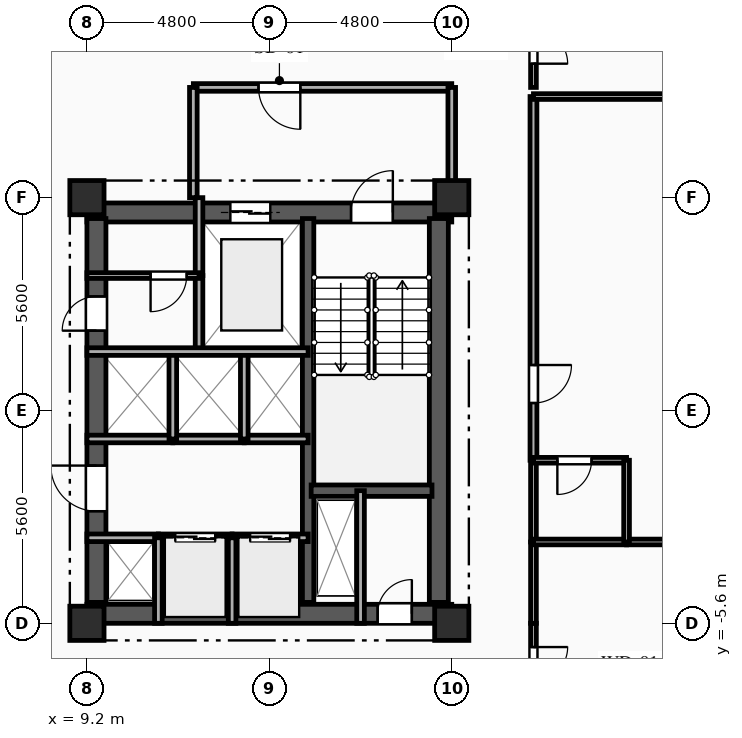
"""IFC4 building model, lengths in metres.
Left out: names, types, materials, properties, quantities, classifications, styles, units other than length and angle.
Written with IfcOpenShell. Run it as: python <this file> out.ifc"""

import sys

from ifc_helpers import new_model, si_unit, direction, frame, frame_2d, origin, origin_2d, place, context, subcontext, project, spatial, rectangle, extrude, element, fill, save


model = new_model("IFC4")
c1 = context("Model", 3, precision=1e-05, world=origin(), true_north=direction((0.0, 1.0)))
c2 = subcontext(c1, "Body", "Model", "MODEL_VIEW")
j1 = project(units=[si_unit("LENGTHUNIT", "METRE"), si_unit("PLANEANGLEUNIT", "RADIAN")], contexts=[c1])
p1 = place(None, origin())
s1 = spatial("IfcSite", under=j1, at=p1, CompositionType="ELEMENT")
p2 = place(p1, origin())
s2 = spatial("IfcBuilding", under=s1, at=p2, CompositionType="ELEMENT")
p3 = place(p2, frame((0.0, 0.0, 151.1)))
s3 = spatial("IfcBuildingStorey", under=s2, at=p3, CompositionType="ELEMENT", Elevation=151.1)
for number, where, z_axis, x_axis in (
    (1, (9.2, -5.6, 0.0), (0.0, 0.0, 1.0), (1.0, 0.0, 0.0)),
    (2, (9.2, 5.6, 0.0), (0.0, 0.0, 1.0), (1.0, 0.0, 0.0)),
    (3, (18.8, -5.6, 0.0), (0.0, 0.0, 1.0), (1.0, 0.0, 0.0)),
    (4, (18.8, 5.6, 0.0), (0.0, 0.0, 1.0), (1.0, 0.0, 0.0)),
):
    element("IfcColumn", number, at=place(p3, frame(where, z_axis=z_axis, x_axis=x_axis)), inside=s3, PredefinedType="COLUMN", context=c2, shape_type="SweptSolid", body=[
        extrude(rectangle(XDim=0.9, YDim=0.9, at=origin_2d()), origin(), (0.0, 0.0, 1.0), 3.35),
    ])
p4 = place(p3, frame((9.2, 5.21, 0.0), z_axis=(0.0, 0.0, 1.0), x_axis=(1.0, 0.0, 0.0)))
e5 = element("IfcWall", 5, at=p4, inside=s3, PredefinedType="SHEAR", context=c2, shape_type="SweptSolid", body=[
    extrude(rectangle(XDim=9.6, YDim=0.5, at=frame_2d((4.8, 0.0))), origin(), (0.0, 0.0, 1.0), 3.04),
])
p5 = place(p4, frame((6.95, 0.0, 0.0)))
e6 = element("IfcOpeningElement", 6, at=p5, cuts=e5, PredefinedType="OPENING", context=c2, shape_type="SweptSolid", body=[
    extrude(rectangle(XDim=1.1, YDim=2.15, at=frame_2d((0.55, 1.075))), frame((0.0, 0.26, 0.0), z_axis=(0.0, -1.0, 0.0), x_axis=(1.0, 0.0, 0.0)), (0.0, 0.0, 1.0), 0.52),
])
p6 = place(p4, frame((3.775, 0.0, 0.0)))
e7 = element("IfcOpeningElement", 7, at=p6, cuts=e5, PredefinedType="OPENING", context=c2, shape_type="SweptSolid", body=[
    extrude(rectangle(XDim=1.05, YDim=2.1, at=frame_2d((0.525, 1.05))), frame((0.0, 0.26, 0.0), z_axis=(0.0, -1.0, 0.0), x_axis=(1.0, 0.0, 0.0)), (0.0, 0.0, 1.0), 0.52),
])
p7 = place(p3, frame((9.2, -5.35, 0.0), z_axis=(0.0, 0.0, 1.0), x_axis=(1.0, 0.0, 0.0)))
e8 = element("IfcWall", 8, at=p7, inside=s3, PredefinedType="SHEAR", context=c2, shape_type="SweptSolid", body=[
    extrude(rectangle(XDim=9.6, YDim=0.5, at=frame_2d((4.8, 0.0))), origin(), (0.0, 0.0, 1.0), 3.04),
])
p8 = place(p7, frame((7.65, 0.0, 0.0)))
e9 = element("IfcOpeningElement", 9, at=p8, cuts=e8, PredefinedType="OPENING", context=c2, shape_type="SweptSolid", body=[
    extrude(rectangle(XDim=0.9, YDim=2.1, at=frame_2d((0.45, 1.05))), frame((0.0, 0.26, 0.0), z_axis=(0.0, -1.0, 0.0), x_axis=(1.0, 0.0, 0.0)), (0.0, 0.0, 1.0), 0.52),
])
p9 = place(p3, frame((9.45, -5.05, 0.0), z_axis=(0.0, 0.0, 1.0), x_axis=(0.0, 1.0, 0.0)))
e10 = element("IfcWall", 10, at=p9, inside=s3, PredefinedType="SHEAR", context=c2, shape_type="SweptSolid", body=[
    extrude(rectangle(XDim=10.1, YDim=0.5, at=frame_2d((5.05, 0.0))), origin(), (0.0, 0.0, 1.0), 3.04),
])
p10 = place(p9, frame((7.15, 0.0, 0.0)))
e11 = element("IfcOpeningElement", 11, at=p10, cuts=e10, PredefinedType="OPENING", context=c2, shape_type="SweptSolid", body=[
    extrude(rectangle(XDim=0.9, YDim=2.1, at=frame_2d((0.45, 1.05))), frame((0.0, 0.26, 0.0), z_axis=(0.0, -1.0, 0.0), x_axis=(1.0, 0.0, 0.0)), (0.0, 0.0, 1.0), 0.52),
])
p11 = place(p9, frame((2.4, 0.0, 0.0)))
e12 = element("IfcOpeningElement", 12, at=p11, cuts=e10, PredefinedType="OPENING", context=c2, shape_type="SweptSolid", body=[
    extrude(rectangle(XDim=1.2, YDim=2.15, at=frame_2d((0.6, 1.075))), frame((0.0, 0.26, 0.0), z_axis=(0.0, -1.0, 0.0), x_axis=(1.0, 0.0, 0.0)), (0.0, 0.0, 1.0), 0.52),
])
p12 = place(p3, frame((18.46, -5.05, 0.0), z_axis=(0.0, 0.0, 1.0), x_axis=(0.0, 1.0, 0.0)))
e13 = element("IfcWall", 13, at=p12, inside=s3, PredefinedType="SHEAR", context=c2, shape_type="SweptSolid", body=[
    extrude(rectangle(XDim=10.1, YDim=0.5, at=frame_2d((5.05, 0.0))), origin(), (0.0, 0.0, 1.0), 3.04),
])
p13 = place(p3, frame((15.02, -5.05, 0.0), z_axis=(0.0, 0.0, 1.0), x_axis=(0.0, 1.0, 0.0)))
e14 = element("IfcWall", 14, at=p13, inside=s3, PredefinedType="SHEAR", context=c2, shape_type="SweptSolid", body=[
    extrude(rectangle(XDim=10.1, YDim=0.3, at=frame_2d((5.05, 0.0))), origin(), (0.0, 0.0, 1.0), 3.04),
])
p14 = place(p3, frame((15.1, -2.11, 0.0), z_axis=(0.0, 0.0, 1.0), x_axis=(1.0, 0.0, 0.0)))
e15 = element("IfcWall", 15, at=p14, inside=s3, PredefinedType="SHEAR", context=c2, shape_type="SweptSolid", body=[
    extrude(rectangle(XDim=3.18, YDim=0.3, at=frame_2d((1.59, 0.0))), origin(), (0.0, 0.0, 1.0), 3.04),
])
p15 = place(p3, frame((16.4, -2.11, 0.0), z_axis=(0.0, 0.0, 1.0), x_axis=(0.0, -1.0, 0.0)))
e16 = element("IfcWall", 16, at=p15, inside=s3, PredefinedType="PARTITIONING", context=c2, shape_type="SweptSolid", body=[
    extrude(rectangle(XDim=3.49, YDim=0.2, at=frame_2d((1.745, 0.0))), origin(), (0.0, 0.0, 1.0), 3.04),
])
p16 = place(p3, frame((12.15, 3.55, 0.0), z_axis=(0.0, 0.0, 1.0), x_axis=(0.0, -1.0, 0.0)))
e17 = element("IfcWall", 17, at=p16, inside=s3, PredefinedType="PARTITIONING", context=c2, shape_type="SweptSolid", body=[
    extrude(rectangle(XDim=2.0, YDim=0.2, at=frame_2d((1.0, 0.0))), origin(), (0.0, 0.0, 1.0), 3.04),
])
p17 = place(p3, frame((12.15, 5.6, 0.0), z_axis=(0.0, 0.0, 1.0), x_axis=(0.0, -1.0, 0.0)))
e18 = element("IfcWall", 18, at=p17, inside=s3, PredefinedType="PARTITIONING", context=c2, shape_type="SweptSolid", body=[
    extrude(rectangle(XDim=2.05, YDim=0.2, at=frame_2d((1.025, 0.0))), origin(), (0.0, 0.0, 1.0), 3.04),
])
p18 = place(p3, frame((18.8, 8.5, 0.0), z_axis=(0.0, 0.0, 1.0), x_axis=(-1.0, 0.0, 0.0)))
e19 = element("IfcWall", 19, at=p18, inside=s3, PredefinedType="PARTITIONING", context=c2, shape_type="SweptSolid", body=[
    extrude(rectangle(XDim=6.8, YDim=0.2, at=frame_2d((3.4, 0.0))), origin(), (0.0, 0.0, 1.0), 3.04),
])
p19 = place(p18, frame((3.985, 0.0, 0.0)))
e20 = element("IfcOpeningElement", 20, at=p19, cuts=e19, PredefinedType="OPENING", context=c2, shape_type="SweptSolid", body=[
    extrude(rectangle(XDim=1.1, YDim=2.15, at=frame_2d((0.55, 1.075))), frame((0.0, 0.11, 0.0), z_axis=(0.0, -1.0, 0.0), x_axis=(1.0, 0.0, 0.0)), (0.0, 0.0, 1.0), 0.22),
])
p20 = place(p3, frame((18.8, 5.6, 0.0), z_axis=(0.0, 0.0, 1.0), x_axis=(0.0, 1.0, 0.0)))
e21 = element("IfcWall", 21, at=p20, inside=s3, PredefinedType="PARTITIONING", context=c2, shape_type="SweptSolid", body=[
    extrude(rectangle(XDim=2.9, YDim=0.2, at=frame_2d((1.45, 0.0))), origin(), (0.0, 0.0, 1.0), 2.525),
])
p21 = place(p3, frame((12.0, 8.5, 0.0), z_axis=(0.0, 0.0, 1.0), x_axis=(0.0, -1.0, 0.0)))
e22 = element("IfcWall", 22, at=p21, inside=s3, PredefinedType="PARTITIONING", context=c2, shape_type="SweptSolid", body=[
    extrude(rectangle(XDim=2.9, YDim=0.2, at=frame_2d((1.45, 0.0))), origin(), (0.0, 0.0, 1.0), 3.04),
])
p22 = place(p3, frame((12.15, 3.55, 0.0), z_axis=(0.0, 0.0, 1.0), x_axis=(-1.0, 0.0, 0.0)))
e23 = element("IfcWall", 23, at=p22, inside=s3, PredefinedType="PARTITIONING", context=c2, shape_type="SweptSolid", body=[
    extrude(rectangle(XDim=2.95, YDim=0.15, at=frame_2d((1.475, 0.0))), origin(), (0.0, 0.0, 1.0), 3.04),
])
p23 = place(p22, frame((0.325, 0.0, 0.0)))
e24 = element("IfcOpeningElement", 24, at=p23, cuts=e23, PredefinedType="OPENING", context=c2, shape_type="SweptSolid", body=[
    extrude(rectangle(XDim=0.95, YDim=2.1, at=frame_2d((0.475, 1.05))), frame((0.0, 0.085, 0.0), z_axis=(0.0, -1.0, 0.0), x_axis=(1.0, 0.0, 0.0)), (0.0, 0.0, 1.0), 0.17),
])
p24 = place(p3, frame((9.2, -3.35, 0.0), z_axis=(0.0, 0.0, 1.0), x_axis=(1.0, 0.0, 0.0)))
e25 = element("IfcWall", 25, at=p24, inside=s3, PredefinedType="PARTITIONING", context=c2, shape_type="SweptSolid", body=[
    extrude(rectangle(XDim=1.88, YDim=0.2, at=frame_2d((0.94, 0.0))), origin(), (0.0, 0.0, 1.0), 2.755),
])
p25 = place(p3, frame((11.08, -3.35, 0.0), z_axis=(0.0, 0.0, 1.0), x_axis=(1.0, 0.0, 0.0)))
e26 = element("IfcWall", 26, at=p25, inside=s3, PredefinedType="PARTITIONING", context=c2, shape_type="SweptSolid", body=[
    extrude(rectangle(XDim=1.94, YDim=0.2, at=frame_2d((0.97, 0.0))), origin(), (0.0, 0.0, 1.0), 3.04),
])
p26 = place(p25, frame((0.445, 0.0, 0.0)))
e27 = element("IfcOpeningElement", 27, at=p26, cuts=e26, PredefinedType="OPENING", context=c2, shape_type="SweptSolid", body=[
    extrude(rectangle(XDim=1.05, YDim=2.1, at=frame_2d((0.525, 1.05))), frame((0.0, 0.11, 0.0), z_axis=(0.0, -1.0, 0.0), x_axis=(1.0, 0.0, 0.0)), (0.0, 0.0, 1.0), 0.22),
])
p27 = place(p3, frame((13.02, -3.35, 0.0), z_axis=(0.0, 0.0, 1.0), x_axis=(1.0, 0.0, 0.0)))
e28 = element("IfcWall", 28, at=p27, inside=s3, PredefinedType="PARTITIONING", context=c2, shape_type="SweptSolid", body=[
    extrude(rectangle(XDim=2.0, YDim=0.2, at=frame_2d((1.0, 0.0))), origin(), (0.0, 0.0, 1.0), 3.04),
])
p28 = place(p27, frame((0.475, 0.0, 0.0)))
e29 = element("IfcOpeningElement", 29, at=p28, cuts=e28, PredefinedType="OPENING", context=c2, shape_type="SweptSolid", body=[
    extrude(rectangle(XDim=1.05, YDim=2.1, at=frame_2d((0.525, 1.05))), frame((0.0, 0.11, 0.0), z_axis=(0.0, -1.0, 0.0), x_axis=(1.0, 0.0, 0.0)), (0.0, 0.0, 1.0), 0.22),
])
p29 = place(p3, frame((11.46, -0.75, 0.0), z_axis=(0.0, 0.0, 1.0), x_axis=(-1.0, 0.0, 0.0)))
e30 = element("IfcWall", 30, at=p29, inside=s3, PredefinedType="PARTITIONING", context=c2, shape_type="SweptSolid", body=[
    extrude(rectangle(XDim=2.26, YDim=0.2, at=frame_2d((1.13, 0.0))), origin(), (0.0, 0.0, 1.0), 3.04),
])
p30 = place(p3, frame((13.34, -0.75, 0.0), z_axis=(0.0, 0.0, 1.0), x_axis=(-1.0, 0.0, 0.0)))
e31 = element("IfcWall", 31, at=p30, inside=s3, PredefinedType="PARTITIONING", context=c2, shape_type="SweptSolid", body=[
    extrude(rectangle(XDim=1.88, YDim=0.2, at=frame_2d((0.94, 0.0))), origin(), (0.0, 0.0, 1.0), 3.04),
])
p31 = place(p3, frame((15.02, -0.75, 0.0), z_axis=(0.0, 0.0, 1.0), x_axis=(-1.0, 0.0, 0.0)))
e32 = element("IfcWall", 32, at=p31, inside=s3, PredefinedType="PARTITIONING", context=c2, shape_type="SweptSolid", body=[
    extrude(rectangle(XDim=1.68, YDim=0.2, at=frame_2d((0.84, 0.0))), origin(), (0.0, 0.0, 1.0), 3.04),
])
for number, where, z_axis, x_axis in (
    (33, (11.08, -5.6, 0.0), (0.0, 0.0, 1.0), (0.0, 1.0, 0.0)),
    (34, (13.02, -5.6, 0.0), (0.0, 0.0, 1.0), (0.0, 1.0, 0.0)),
):
    element("IfcWall", number, at=place(p3, frame(where, z_axis=z_axis, x_axis=x_axis)), inside=s3, PredefinedType="PARTITIONING", context=c2, shape_type="SweptSolid", body=[
        extrude(rectangle(XDim=2.25, YDim=0.2, at=frame_2d((1.125, 0.0))), origin(), (0.0, 0.0, 1.0), 3.04),
    ])
for number, where, z_axis, x_axis in (
    (35, (11.46, -0.75, 0.0), (0.0, 0.0, 1.0), (0.0, 1.0, 0.0)),
    (36, (13.34, -0.75, 0.0), (0.0, 0.0, 1.0), (0.0, 1.0, 0.0)),
):
    element("IfcWall", number, at=place(p3, frame(where, z_axis=z_axis, x_axis=x_axis)), inside=s3, PredefinedType="PARTITIONING", context=c2, shape_type="SweptSolid", body=[
        extrude(rectangle(XDim=2.3, YDim=0.2, at=frame_2d((1.15, 0.0))), origin(), (0.0, 0.0, 1.0), 3.04),
    ])
p32 = place(p3, frame((20.95, 10.65, 0.0), z_axis=(0.0, 0.0, 1.0), x_axis=(0.0, -1.0, 0.0)))
e37 = element("IfcWall", 37, at=p32, inside=s3, PredefinedType="PARTITIONING", context=c2, shape_type="SweptSolid", body=[
    extrude(rectangle(XDim=2.15, YDim=0.15, at=frame_2d((1.075, 0.0))), origin(), (0.0, 0.0, 1.0), 3.04),
])
p33 = place(p32, frame((0.625, 0.0, 0.0)))
e38 = element("IfcOpeningElement", 38, at=p33, cuts=e37, PredefinedType="OPENING", context=c2, shape_type="SweptSolid", body=[
    extrude(rectangle(XDim=0.9, YDim=2.1, at=frame_2d((0.45, 1.05))), frame((0.0, 0.085, 0.0), z_axis=(0.0, -1.0, 0.0), x_axis=(1.0, 0.0, 0.0)), (0.0, 0.0, 1.0), 0.17),
])
p34 = place(p3, frame((20.95, -5.6, 0.0), z_axis=(0.0, 0.0, 1.0), x_axis=(0.0, -1.0, 0.0)))
e39 = element("IfcWall", 39, at=p34, inside=s3, PredefinedType="PARTITIONING", context=c2, shape_type="SweptSolid", body=[
    extrude(rectangle(XDim=2.15, YDim=0.15, at=frame_2d((1.075, 0.0))), origin(), (0.0, 0.0, 1.0), 3.04),
])
p35 = place(p34, frame((0.625, 0.0, 0.0)))
e40 = element("IfcOpeningElement", 40, at=p35, cuts=e39, PredefinedType="OPENING", context=c2, shape_type="SweptSolid", body=[
    extrude(rectangle(XDim=0.9, YDim=2.1, at=frame_2d((0.45, 1.05))), frame((0.0, 0.085, 0.0), z_axis=(0.0, -1.0, 0.0), x_axis=(1.0, 0.0, 0.0)), (0.0, 0.0, 1.0), 0.17),
])
p36 = place(p3, frame((20.95, -3.46, 0.0), z_axis=(0.0, 0.0, 1.0), x_axis=(0.0, -1.0, 0.0)))
e41 = element("IfcWall", 41, at=p36, inside=s3, PredefinedType="PARTITIONING", context=c2, shape_type="SweptSolid", body=[
    extrude(rectangle(XDim=2.14, YDim=0.15, at=frame_2d((1.07, 0.0))), origin(), (0.0, 0.0, 1.0), 3.04),
])
p37 = place(p3, frame((20.95, 8.26, 0.0), z_axis=(0.0, 0.0, 1.0), x_axis=(0.0, -1.0, 0.0)))
e42 = element("IfcWall", 42, at=p37, inside=s3, PredefinedType="PARTITIONING", context=c2, shape_type="SweptSolid", body=[
    extrude(rectangle(XDim=9.57, YDim=0.18, at=frame_2d((4.785, 0.0))), origin(), (0.0, 0.0, 1.0), 3.04),
])
p38 = place(p37, frame((7.064, 0.0, 0.0)))
e43 = element("IfcOpeningElement", 43, at=p38, cuts=e42, PredefinedType="OPENING", context=c2, shape_type="SweptSolid", body=[
    extrude(rectangle(XDim=1.0, YDim=2.15, at=frame_2d((0.5, 1.075))), frame((0.0, 0.1, 0.0), z_axis=(0.0, -1.0, 0.0), x_axis=(1.0, 0.0, 0.0)), (0.0, 0.0, 1.0), 0.2),
])
p39 = place(p3, frame((20.95, -1.31, 0.0), z_axis=(0.0, 0.0, 1.0), x_axis=(0.0, -1.0, 0.0)))
e44 = element("IfcWall", 44, at=p39, inside=s3, PredefinedType="PLUMBINGWALL", context=c2, shape_type="SweptSolid", body=[
    extrude(rectangle(XDim=2.15, YDim=0.15, at=frame_2d((1.075, 0.0))), origin(), (0.0, 0.0, 1.0), 3.04),
])
p40 = place(p3, frame((23.4, -3.46, 0.0), z_axis=(0.0, 0.0, 1.0), x_axis=(1.0, 0.0, 0.0)))
e45 = element("IfcWall", 45, at=p40, inside=s3, PredefinedType="PARTITIONING", context=c2, shape_type="SweptSolid", body=[
    extrude(rectangle(XDim=3.6, YDim=0.15, at=frame_2d((1.8, 0.0))), origin(), (0.0, 0.0, 1.0), 3.04),
])
p41 = place(p3, frame((20.95, -3.46, 0.0), z_axis=(0.0, 0.0, 1.0), x_axis=(1.0, 0.0, 0.0)))
e46 = element("IfcWall", 46, at=p41, inside=s3, PredefinedType="PLUMBINGWALL", context=c2, shape_type="SweptSolid", body=[
    extrude(rectangle(XDim=2.45, YDim=0.15, at=frame_2d((1.225, 0.0))), origin(), (0.0, 0.0, 1.0), 3.04),
])
p42 = place(p3, frame((23.4, -1.31, 0.0), z_axis=(0.0, 0.0, 1.0), x_axis=(-1.0, 0.0, 0.0)))
e47 = element("IfcWall", 47, at=p42, inside=s3, PredefinedType="PLUMBINGWALL", context=c2, shape_type="SweptSolid", body=[
    extrude(rectangle(XDim=2.45, YDim=0.15, at=frame_2d((1.225, 0.0))), origin(), (0.0, 0.0, 1.0), 3.04),
])
p43 = place(p42, frame((0.921, 0.0, 0.0)))
e48 = element("IfcOpeningElement", 48, at=p43, cuts=e47, PredefinedType="OPENING", context=c2, shape_type="SweptSolid", body=[
    extrude(rectangle(XDim=0.9, YDim=2.1, at=frame_2d((0.45, 1.05))), frame((0.0, 0.085, 0.0), z_axis=(0.0, -1.0, 0.0), x_axis=(1.0, 0.0, 0.0)), (0.0, 0.0, 1.0), 0.17),
])
p44 = place(p3, frame((23.4, -3.46, 0.0), z_axis=(0.0, 0.0, 1.0), x_axis=(0.0, 1.0, 0.0)))
e49 = element("IfcWall", 49, at=p44, inside=s3, PredefinedType="PLUMBINGWALL", context=c2, shape_type="SweptSolid", body=[
    extrude(rectangle(XDim=2.15, YDim=0.15, at=frame_2d((1.075, 0.0))), origin(), (0.0, 0.0, 1.0), 3.04),
])
p45 = place(p3, frame((20.95, 8.26, 0.0), z_axis=(0.0, 0.0, 1.0), x_axis=(1.0, 0.0, 0.0)))
e50 = element("IfcWall", 50, at=p45, inside=s3, PredefinedType="PARTITIONING", context=c2, shape_type="SweptSolid", body=[
    extrude(rectangle(XDim=6.05, YDim=0.15, at=frame_2d((3.025, 0.0))), origin(), (0.0, 0.0, 1.0), 3.04),
])
p46 = place(p3, frame((9.2, 1.55, 0.0), z_axis=(0.0, 0.0, 1.0), x_axis=(1.0, 0.0, 0.0)))
e51 = element("IfcWall", 51, at=p46, inside=s3, PredefinedType="PARTITIONING", context=c2, shape_type="SweptSolid", body=[
    extrude(rectangle(XDim=5.82, YDim=0.2, at=frame_2d((2.91, 0.0))), origin(), (0.0, 0.0, 1.0), 3.04),
])
p47 = place(p5, origin())
e52 = element("IfcDoor", 52, at=p47, inside=s3, OperationType="SINGLE_SWING_RIGHT", PredefinedType="DOOR", context=c2, shape_type="SweptSolid", body=[
    extrude(rectangle(XDim=1.1, YDim=2.15, at=frame_2d((0.55, 1.075))), frame((0.0, 0.025, 0.0), z_axis=(0.0, -1.0, 0.0), x_axis=(1.0, 0.0, 0.0)), (0.0, 0.0, 1.0), 0.05),
])
fill(e6, e52)
p48 = place(p6, origin())
e53 = element("IfcDoor", 53, at=p48, inside=s3, OperationType="DOUBLE_DOOR_SLIDING", PredefinedType="DOOR", context=c2, shape_type="SweptSolid", body=[
    extrude(rectangle(XDim=1.05, YDim=2.1, at=frame_2d((0.525, 1.05))), frame((0.0, 0.025, 0.0), z_axis=(0.0, -1.0, 0.0), x_axis=(1.0, 0.0, 0.0)), (0.0, 0.0, 1.0), 0.05),
])
fill(e7, e53)
p49 = place(p8, origin())
e54 = element("IfcDoor", 54, at=p49, inside=s3, OperationType="SINGLE_SWING_RIGHT", PredefinedType="DOOR", context=c2, shape_type="SweptSolid", body=[
    extrude(rectangle(XDim=0.9, YDim=2.1, at=frame_2d((0.45, 1.05))), frame((0.0, 0.025, 0.0), z_axis=(0.0, -1.0, 0.0), x_axis=(1.0, 0.0, 0.0)), (0.0, 0.0, 1.0), 0.05),
])
fill(e9, e54)
p50 = place(p19, origin())
e55 = element("IfcDoor", 55, at=p50, inside=s3, OperationType="SINGLE_SWING_LEFT", PredefinedType="DOOR", context=c2, shape_type="SweptSolid", body=[
    extrude(rectangle(XDim=1.1, YDim=2.15, at=frame_2d((0.55, 1.075))), frame((0.0, 0.025, 0.0), z_axis=(0.0, -1.0, 0.0), x_axis=(1.0, 0.0, 0.0)), (0.0, 0.0, 1.0), 0.05),
])
fill(e20, e55)
p51 = place(p23, origin())
e56 = element("IfcDoor", 56, at=p51, inside=s3, OperationType="SINGLE_SWING_RIGHT", PredefinedType="DOOR", context=c2, shape_type="SweptSolid", body=[
    extrude(rectangle(XDim=0.95, YDim=2.1, at=frame_2d((0.475, 1.05))), frame((0.0, 0.025, 0.0), z_axis=(0.0, -1.0, 0.0), x_axis=(1.0, 0.0, 0.0)), (0.0, 0.0, 1.0), 0.05),
])
fill(e24, e56)
p52 = place(p10, origin())
e57 = element("IfcDoor", 57, at=p52, inside=s3, OperationType="SINGLE_SWING_LEFT", PredefinedType="DOOR", context=c2, shape_type="SweptSolid", body=[
    extrude(rectangle(XDim=0.9, YDim=2.1, at=frame_2d((0.45, 1.05))), frame((0.0, 0.025, 0.0), z_axis=(0.0, -1.0, 0.0), x_axis=(1.0, 0.0, 0.0)), (0.0, 0.0, 1.0), 0.05),
])
fill(e11, e57)
p53 = place(p26, origin())
e58 = element("IfcDoor", 58, at=p53, inside=s3, OperationType="DOUBLE_DOOR_SLIDING", PredefinedType="DOOR", context=c2, shape_type="SweptSolid", body=[
    extrude(rectangle(XDim=1.05, YDim=2.1, at=frame_2d((0.525, 1.05))), frame((0.0, 0.025, 0.0), z_axis=(0.0, -1.0, 0.0), x_axis=(1.0, 0.0, 0.0)), (0.0, 0.0, 1.0), 0.05),
])
fill(e27, e58)
p54 = place(p28, origin())
e59 = element("IfcDoor", 59, at=p54, inside=s3, OperationType="DOUBLE_DOOR_SLIDING", PredefinedType="DOOR", context=c2, shape_type="SweptSolid", body=[
    extrude(rectangle(XDim=1.05, YDim=2.1, at=frame_2d((0.525, 1.05))), frame((0.0, 0.025, 0.0), z_axis=(0.0, -1.0, 0.0), x_axis=(1.0, 0.0, 0.0)), (0.0, 0.0, 1.0), 0.05),
])
fill(e29, e59)
p55 = place(p11, origin())
e60 = element("IfcDoor", 60, at=p55, inside=s3, OperationType="SINGLE_SWING_RIGHT", PredefinedType="DOOR", context=c2, shape_type="SweptSolid", body=[
    extrude(rectangle(XDim=1.2, YDim=2.15, at=frame_2d((0.6, 1.075))), frame((0.0, 0.025, 0.0), z_axis=(0.0, -1.0, 0.0), x_axis=(1.0, 0.0, 0.0)), (0.0, 0.0, 1.0), 0.05),
])
fill(e12, e60)
p56 = place(p33, origin())
e61 = element("IfcDoor", 61, at=p56, inside=s3, OperationType="SINGLE_SWING_RIGHT", PredefinedType="DOOR", context=c2, shape_type="SweptSolid", body=[
    extrude(rectangle(XDim=0.9, YDim=2.1, at=frame_2d((0.45, 1.05))), frame((0.0, 0.025, 0.0), z_axis=(0.0, -1.0, 0.0), x_axis=(1.0, 0.0, 0.0)), (0.0, 0.0, 1.0), 0.05),
])
fill(e38, e61)
p57 = place(p35, origin())
e62 = element("IfcDoor", 62, at=p57, inside=s3, OperationType="SINGLE_SWING_LEFT", PredefinedType="DOOR", context=c2, shape_type="SweptSolid", body=[
    extrude(rectangle(XDim=0.9, YDim=2.1, at=frame_2d((0.45, 1.05))), frame((0.0, 0.025, 0.0), z_axis=(0.0, -1.0, 0.0), x_axis=(1.0, 0.0, 0.0)), (0.0, 0.0, 1.0), 0.05),
])
fill(e40, e62)
p58 = place(p38, origin())
e63 = element("IfcDoor", 63, at=p58, inside=s3, OperationType="SINGLE_SWING_LEFT", PredefinedType="DOOR", context=c2, shape_type="SweptSolid", body=[
    extrude(rectangle(XDim=1.0, YDim=2.15, at=frame_2d((0.5, 1.075))), frame((0.0, 0.025, 0.0), z_axis=(0.0, -1.0, 0.0), x_axis=(1.0, 0.0, 0.0)), (0.0, 0.0, 1.0), 0.05),
])
fill(e43, e63)
p59 = place(p43, origin())
e64 = element("IfcDoor", 64, at=p59, inside=s3, OperationType="SINGLE_SWING_RIGHT", PredefinedType="DOOR", context=c2, shape_type="SweptSolid", body=[
    extrude(rectangle(XDim=0.9, YDim=2.1, at=frame_2d((0.45, 1.05))), frame((0.0, 0.025, 0.0), z_axis=(0.0, -1.0, 0.0), x_axis=(1.0, 0.0, 0.0)), (0.0, 0.0, 1.0), 0.05),
])
fill(e48, e64)
save(model, sys.argv[1])
